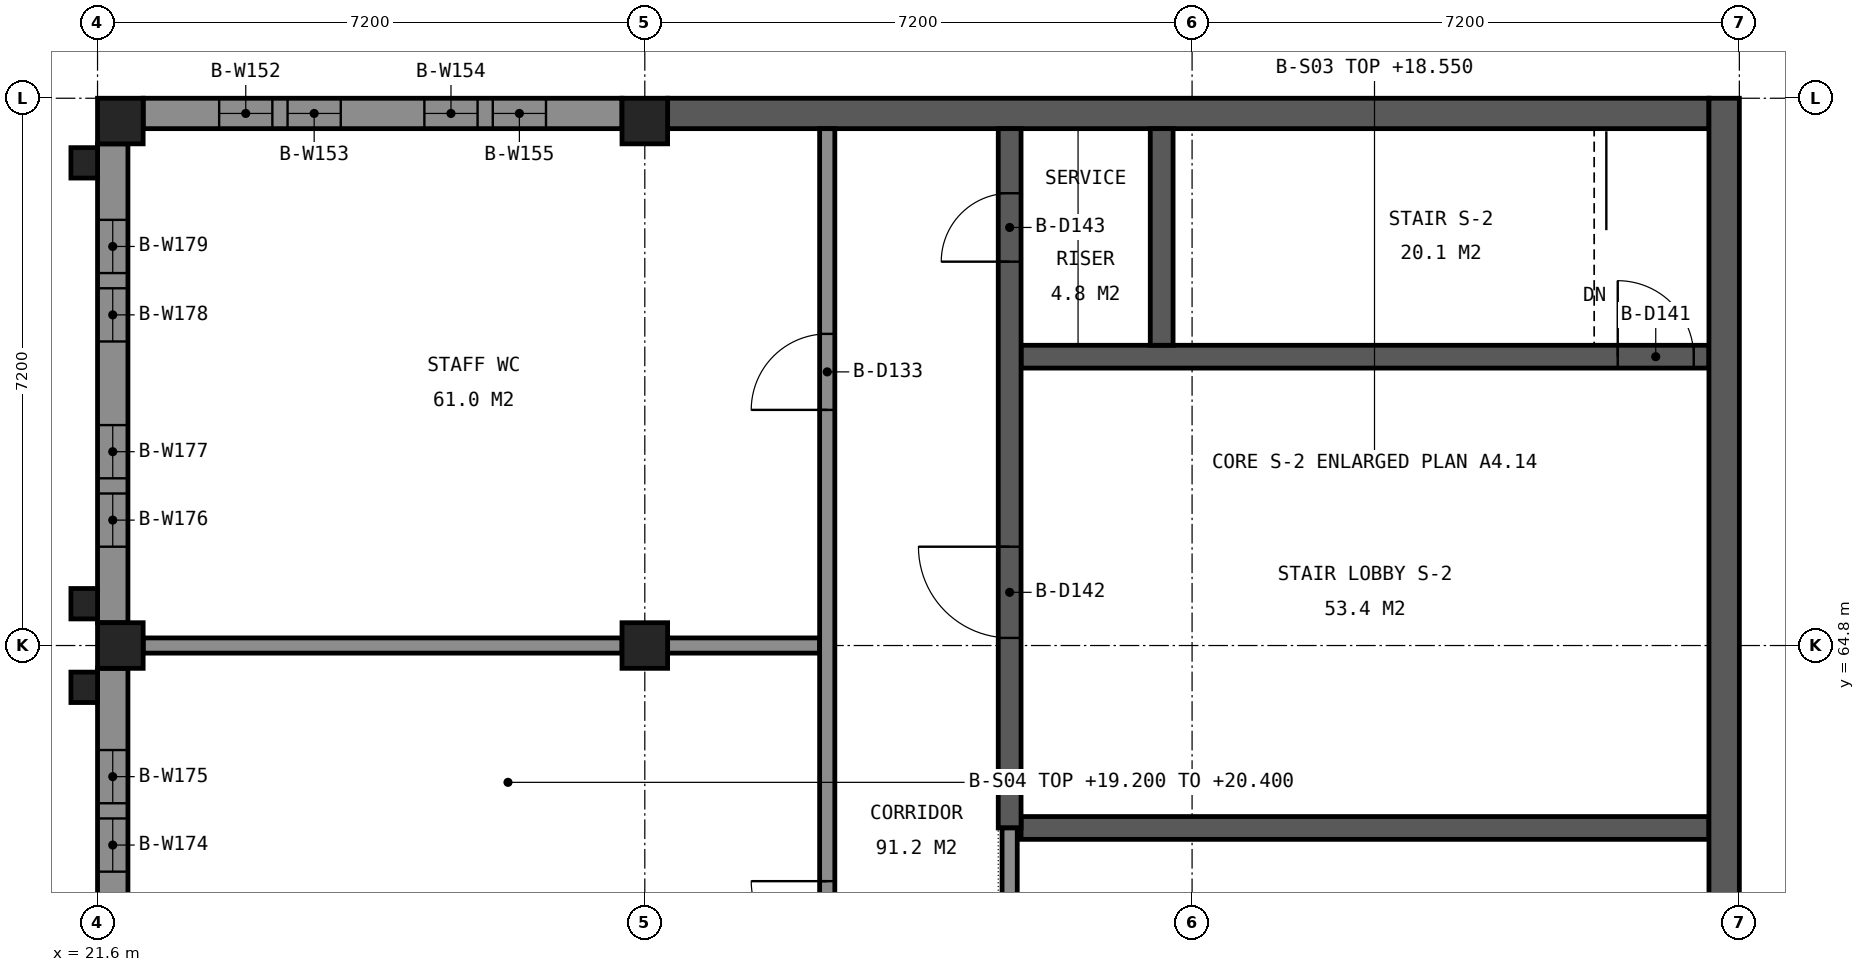
"""IFC4 building model, lengths in metres.
Left out: names, types, materials, properties, quantities, classifications, styles, units other than length and angle.
Written with IfcOpenShell. Run it as: python <this file> out.ifc"""

import sys

from ifc_helpers import new_model, si_unit, direction, frame, frame_2d, origin, origin_2d, place, context, subcontext, project, spatial, polyline, rectangle, outline, extrude, element, fill, save


model = new_model("IFC4")
c1 = context("Model", 3, precision=1e-05, world=origin(), true_north=direction((0.0, 1.0)))
c2 = subcontext(c1, "Body", "Model", "MODEL_VIEW")
j1 = project(units=[si_unit("LENGTHUNIT", "METRE"), si_unit("PLANEANGLEUNIT", "RADIAN")], contexts=[c1])
p1 = place(None, origin())
s1 = spatial("IfcSite", under=j1, at=p1, CompositionType="ELEMENT")
p2 = place(p1, origin())
s2 = spatial("IfcBuilding", under=s1, at=p2, CompositionType="ELEMENT")
p3 = place(p2, frame((0.0, 0.0, 14.4)))
s3 = spatial("IfcBuildingStorey", under=s2, at=p3, CompositionType="ELEMENT", Elevation=14.4)
for number, where, z_axis, x_axis in (
    (1, (21.9, 64.8, 0.0), (0.0, 0.0, 1.0), (1.0, 0.0, 0.0)),
    (2, (21.9, 71.7, 0.0), (0.0, 0.0, 1.0), (1.0, 0.0, 0.0)),
):
    element("IfcColumn", number, at=place(p3, frame(where, z_axis=z_axis, x_axis=x_axis)), inside=s3, PredefinedType="COLUMN", context=c2, shape_type="SweptSolid", body=[
        extrude(rectangle(XDim=0.6, YDim=0.6, at=origin_2d()), origin(), (0.0, 0.0, 1.0), 4.144),
    ])
for number, where, z_axis, x_axis in (
    (3, (28.8, 64.8, 0.0), (0.0, 0.0, 1.0), (1.0, 0.0, 0.0)),
    (4, (28.8, 71.7, 0.0), (0.0, 0.0, 1.0), (1.0, 0.0, 0.0)),
):
    element("IfcColumn", number, at=place(p3, frame(where, z_axis=z_axis, x_axis=x_axis)), inside=s3, PredefinedType="COLUMN", context=c2, shape_type="SweptSolid", body=[
        extrude(rectangle(XDim=0.6, YDim=0.6, at=origin_2d()), origin(), (0.0, 0.0, 1.0), 4.911),
    ])
p4 = place(p3, frame((33.75, 62.4, 0.0), z_axis=(0.0, 0.0, 1.0), x_axis=(1.0, 0.0, 0.0)))
e5 = element("IfcWall", 5, at=p4, inside=s3, PredefinedType="SHEAR", context=c2, shape_type="SweptSolid", body=[
    extrude(rectangle(XDim=9.05, YDim=0.3, at=frame_2d((4.525, 0.0))), origin(), (0.0, 0.0, 1.0), 3.9),
])
p5 = place(p3, frame((33.75, 68.6, 0.0), z_axis=(0.0, 0.0, 1.0), x_axis=(1.0, 0.0, 0.0)))
e6 = element("IfcWall", 6, at=p5, inside=s3, PredefinedType="SHEAR", context=c2, shape_type="SweptSolid", body=[
    extrude(rectangle(XDim=9.05, YDim=0.3, at=frame_2d((4.525, 0.0))), origin(), (0.0, 0.0, 1.0), 3.9),
])
p6 = place(p5, frame((7.85, 0.0, 0.0)))
e7 = element("IfcOpeningElement", 7, at=p6, cuts=e6, PredefinedType="OPENING", context=c2, shape_type="SweptSolid", body=[
    extrude(rectangle(XDim=1.0, YDim=2.1, at=frame_2d((0.5, 1.05))), frame((0.0, 0.16, 0.0), z_axis=(0.0, -1.0, 0.0), x_axis=(1.0, 0.0, 0.0)), (0.0, 0.0, 1.0), 0.32),
])
p7 = place(p3, frame((29.1, 71.8, 0.0), z_axis=(0.0, 0.0, 1.0), x_axis=(1.0, 0.0, 0.0)))
e8 = element("IfcWall", 8, at=p7, inside=s3, PredefinedType="SHEAR", context=c2, shape_type="SweptSolid", body=[
    extrude(outline(polyline([(0.0, 0.0), (13.7, 0.0), (13.7, 4.155), (3.3, 5.311), (0.0, 4.944), (0.0, 0.0)])), frame((0.0, 0.2, 0.0), z_axis=(0.0, -1.0, 0.0), x_axis=(1.0, 0.0, 0.0)), (0.0, 0.0, 1.0), 0.4),
])
p8 = place(p3, frame((33.6, 62.4, 0.0), z_axis=(0.0, 0.0, 1.0), x_axis=(0.0, 1.0, 0.0)))
e9 = element("IfcWall", 9, at=p8, inside=s3, PredefinedType="SHEAR", context=c2, shape_type="SweptSolid", body=[
    extrude(rectangle(XDim=9.2, YDim=0.3, at=frame_2d((4.6, 0.0))), origin(), (0.0, 0.0, 1.0), 5.161),
])
p9 = place(p8, frame((2.5, 0.0, 0.0)))
e10 = element("IfcOpeningElement", 10, at=p9, cuts=e9, PredefinedType="OPENING", context=c2, shape_type="SweptSolid", body=[
    extrude(rectangle(XDim=1.2, YDim=2.1, at=frame_2d((0.6, 1.05))), frame((0.0, 0.16, 0.0), z_axis=(0.0, -1.0, 0.0), x_axis=(1.0, 0.0, 0.0)), (0.0, 0.0, 1.0), 0.32),
])
p10 = place(p8, frame((7.45, 0.0, 0.0)))
e11 = element("IfcOpeningElement", 11, at=p10, cuts=e9, PredefinedType="OPENING", context=c2, shape_type="SweptSolid", body=[
    extrude(rectangle(XDim=0.9, YDim=2.1, at=frame_2d((0.45, 1.05))), frame((0.0, 0.16, 0.0), z_axis=(0.0, -1.0, 0.0), x_axis=(1.0, 0.0, 0.0)), (0.0, 0.0, 1.0), 0.32),
])
p11 = place(p3, frame((35.6, 68.75, 0.0), z_axis=(0.0, 0.0, 1.0), x_axis=(0.0, 1.0, 0.0)))
e12 = element("IfcWall", 12, at=p11, inside=s3, PredefinedType="SHEAR", context=c2, shape_type="SweptSolid", body=[
    extrude(rectangle(XDim=2.85, YDim=0.3, at=frame_2d((1.425, 0.0))), origin(), (0.0, 0.0, 1.0), 3.9),
])
p12 = place(p3, frame((43.0, 57.9, 0.0), z_axis=(0.0, 0.0, 1.0), x_axis=(0.0, 1.0, 0.0)))
e13 = element("IfcWall", 13, at=p12, inside=s3, PredefinedType="SHEAR", context=c2, shape_type="SweptSolid", body=[
    extrude(rectangle(XDim=14.1, YDim=0.4, at=frame_2d((7.05, 0.0))), origin(), (0.0, 0.0, 1.0), 4.133),
])
p13 = place(p3, frame((22.2, 71.8, 0.0), z_axis=(0.0, 0.0, 1.0), x_axis=(1.0, 0.0, 0.0)))
e14 = element("IfcWall", 14, at=p13, inside=s3, PredefinedType="SOLIDWALL", context=c2, shape_type="SweptSolid", body=[
    extrude(outline(polyline([(0.0, 0.0), (6.3, 0.0), (6.3, 4.878), (0.0, 4.177), (0.0, 0.0)])), frame((0.0, 0.2, 0.0), z_axis=(0.0, -1.0, 0.0), x_axis=(1.0, 0.0, 0.0)), (0.0, 0.0, 1.0), 0.4),
])
p14 = place(p13, frame((1.0, 0.0, 1.6)))
e15 = element("IfcOpeningElement", 15, at=p14, cuts=e14, PredefinedType="OPENING", context=c2, shape_type="SweptSolid", body=[
    extrude(rectangle(XDim=0.7, YDim=1.2, at=frame_2d((0.35, 0.6))), frame((0.0, 0.21, 0.0), z_axis=(0.0, -1.0, 0.0), x_axis=(1.0, 0.0, 0.0)), (0.0, 0.0, 1.0), 0.42),
])
p15 = place(p13, frame((1.9, 0.0, 1.6)))
e16 = element("IfcOpeningElement", 16, at=p15, cuts=e14, PredefinedType="OPENING", context=c2, shape_type="SweptSolid", body=[
    extrude(rectangle(XDim=0.7, YDim=1.2, at=frame_2d((0.35, 0.6))), frame((0.0, 0.21, 0.0), z_axis=(0.0, -1.0, 0.0), x_axis=(1.0, 0.0, 0.0)), (0.0, 0.0, 1.0), 0.42),
])
p16 = place(p13, frame((3.7, 0.0, 1.6)))
e17 = element("IfcOpeningElement", 17, at=p16, cuts=e14, PredefinedType="OPENING", context=c2, shape_type="SweptSolid", body=[
    extrude(rectangle(XDim=0.7, YDim=1.2, at=frame_2d((0.35, 0.6))), frame((0.0, 0.21, 0.0), z_axis=(0.0, -1.0, 0.0), x_axis=(1.0, 0.0, 0.0)), (0.0, 0.0, 1.0), 0.42),
])
p17 = place(p13, frame((4.6, 0.0, 1.6)))
e18 = element("IfcOpeningElement", 18, at=p17, cuts=e14, PredefinedType="OPENING", context=c2, shape_type="SweptSolid", body=[
    extrude(rectangle(XDim=0.7, YDim=1.2, at=frame_2d((0.35, 0.6))), frame((0.0, 0.21, 0.0), z_axis=(0.0, -1.0, 0.0), x_axis=(1.0, 0.0, 0.0)), (0.0, 0.0, 1.0), 0.42),
])
p18 = place(p3, frame((21.8, 57.9, 0.0), z_axis=(0.0, 0.0, 1.0), x_axis=(0.0, 1.0, 0.0)))
e19 = element("IfcWall", 19, at=p18, inside=s3, PredefinedType="SOLIDWALL", context=c2, shape_type="SweptSolid", body=[
    extrude(rectangle(XDim=6.6, YDim=0.4, at=frame_2d((3.3, 0.0))), origin(), (0.0, 0.0, 1.0), 4.133),
])
p19 = place(p18, frame((1.075, 0.0, 1.6)))
e20 = element("IfcOpeningElement", 20, at=p19, cuts=e19, PredefinedType="OPENING", context=c2, shape_type="SweptSolid", body=[
    extrude(rectangle(XDim=0.7, YDim=1.2, at=frame_2d((0.35, 0.6))), frame((0.0, 0.21, 0.0), z_axis=(0.0, -1.0, 0.0), x_axis=(1.0, 0.0, 0.0)), (0.0, 0.0, 1.0), 0.42),
])
p20 = place(p18, frame((1.975, 0.0, 1.6)))
e21 = element("IfcOpeningElement", 21, at=p20, cuts=e19, PredefinedType="OPENING", context=c2, shape_type="SweptSolid", body=[
    extrude(rectangle(XDim=0.7, YDim=1.2, at=frame_2d((0.35, 0.6))), frame((0.0, 0.21, 0.0), z_axis=(0.0, -1.0, 0.0), x_axis=(1.0, 0.0, 0.0)), (0.0, 0.0, 1.0), 0.42),
])
p21 = place(p18, frame((3.925, 0.0, 1.6)))
e22 = element("IfcOpeningElement", 22, at=p21, cuts=e19, PredefinedType="OPENING", context=c2, shape_type="SweptSolid", body=[
    extrude(rectangle(XDim=0.7, YDim=1.2, at=frame_2d((0.35, 0.6))), frame((0.0, 0.21, 0.0), z_axis=(0.0, -1.0, 0.0), x_axis=(1.0, 0.0, 0.0)), (0.0, 0.0, 1.0), 0.42),
])
p22 = place(p18, frame((4.825, 0.0, 1.6)))
e23 = element("IfcOpeningElement", 23, at=p22, cuts=e19, PredefinedType="OPENING", context=c2, shape_type="SweptSolid", body=[
    extrude(rectangle(XDim=0.7, YDim=1.2, at=frame_2d((0.35, 0.6))), frame((0.0, 0.21, 0.0), z_axis=(0.0, -1.0, 0.0), x_axis=(1.0, 0.0, 0.0)), (0.0, 0.0, 1.0), 0.42),
])
p23 = place(p3, frame((21.8, 65.1, 0.0), z_axis=(0.0, 0.0, 1.0), x_axis=(0.0, 1.0, 0.0)))
e24 = element("IfcWall", 24, at=p23, inside=s3, PredefinedType="SOLIDWALL", context=c2, shape_type="SweptSolid", body=[
    extrude(rectangle(XDim=6.3, YDim=0.4, at=frame_2d((3.15, 0.0))), origin(), (0.0, 0.0, 1.0), 4.133),
])
p24 = place(p23, frame((1.0, 0.0, 1.6)))
e25 = element("IfcOpeningElement", 25, at=p24, cuts=e24, PredefinedType="OPENING", context=c2, shape_type="SweptSolid", body=[
    extrude(rectangle(XDim=0.7, YDim=1.2, at=frame_2d((0.35, 0.6))), frame((0.0, 0.21, 0.0), z_axis=(0.0, -1.0, 0.0), x_axis=(1.0, 0.0, 0.0)), (0.0, 0.0, 1.0), 0.42),
])
p25 = place(p23, frame((1.9, 0.0, 1.6)))
e26 = element("IfcOpeningElement", 26, at=p25, cuts=e24, PredefinedType="OPENING", context=c2, shape_type="SweptSolid", body=[
    extrude(rectangle(XDim=0.7, YDim=1.2, at=frame_2d((0.35, 0.6))), frame((0.0, 0.21, 0.0), z_axis=(0.0, -1.0, 0.0), x_axis=(1.0, 0.0, 0.0)), (0.0, 0.0, 1.0), 0.42),
])
p26 = place(p23, frame((3.7, 0.0, 1.6)))
e27 = element("IfcOpeningElement", 27, at=p26, cuts=e24, PredefinedType="OPENING", context=c2, shape_type="SweptSolid", body=[
    extrude(rectangle(XDim=0.7, YDim=1.2, at=frame_2d((0.35, 0.6))), frame((0.0, 0.21, 0.0), z_axis=(0.0, -1.0, 0.0), x_axis=(1.0, 0.0, 0.0)), (0.0, 0.0, 1.0), 0.42),
])
p27 = place(p23, frame((4.6, 0.0, 1.6)))
e28 = element("IfcOpeningElement", 28, at=p27, cuts=e24, PredefinedType="OPENING", context=c2, shape_type="SweptSolid", body=[
    extrude(rectangle(XDim=0.7, YDim=1.2, at=frame_2d((0.35, 0.6))), frame((0.0, 0.21, 0.0), z_axis=(0.0, -1.0, 0.0), x_axis=(1.0, 0.0, 0.0)), (0.0, 0.0, 1.0), 0.42),
])
for number, where, z_axis, x_axis in (
    (29, (21.425, 64.25, 0.0), (0.0, 0.0, 1.0), (1.0, 0.0, 0.0)),
    (30, (21.425, 65.35, 0.0), (0.0, 0.0, 1.0), (1.0, 0.0, 0.0)),
    (31, (21.425, 71.15, 0.0), (0.0, 0.0, 1.0), (1.0, 0.0, 0.0)),
):
    element("IfcColumn", number, at=place(p3, frame(where, z_axis=z_axis, x_axis=x_axis)), inside=s3, PredefinedType="COLUMN", context=c2, shape_type="SweptSolid", body=[
        extrude(rectangle(XDim=0.35, YDim=0.4, at=origin_2d()), origin(), (0.0, 0.0, 1.0), 4.1),
    ])
p28 = place(p3, frame((22.2, 64.8, 0.0), z_axis=(0.0, 0.0, 1.0), x_axis=(1.0, 0.0, 0.0)))
e32 = element("IfcWall", 32, at=p28, inside=s3, PredefinedType="PARTITIONING", context=c2, shape_type="SweptSolid", body=[
    extrude(rectangle(XDim=6.3, YDim=0.2, at=frame_2d((3.15, 0.0))), origin(), (0.0, 0.0, 1.0), 4.0),
])
p29 = place(p3, frame((29.1, 64.8, 0.0), z_axis=(0.0, 0.0, 1.0), x_axis=(1.0, 0.0, 0.0)))
e33 = element("IfcWall", 33, at=p29, inside=s3, PredefinedType="PARTITIONING", context=c2, shape_type="SweptSolid", body=[
    extrude(rectangle(XDim=2.0, YDim=0.2, at=frame_2d((1.0, 0.0))), origin(), (0.0, 0.0, 1.0), 4.0),
])
p30 = place(p3, frame((31.2, 29.2, 0.0), z_axis=(0.0, 0.0, 1.0), x_axis=(0.0, 1.0, 0.0)))
e34 = element("IfcWall", 34, at=p30, inside=s3, PredefinedType="PARTITIONING", context=c2, shape_type="SweptSolid", body=[
    extrude(rectangle(XDim=42.4, YDim=0.2, at=frame_2d((21.2, 0.0))), origin(), (0.0, 0.0, 1.0), 4.0),
])
p31 = place(p30, frame((2.7, 0.0, 0.0)))
e35 = element("IfcOpeningElement", 35, at=p31, cuts=e34, PredefinedType="OPENING", context=c2, shape_type="SweptSolid", body=[
    extrude(rectangle(XDim=1.0, YDim=2.1, at=frame_2d((0.5, 1.05))), frame((0.0, 0.11, 0.0), z_axis=(0.0, -1.0, 0.0), x_axis=(1.0, 0.0, 0.0)), (0.0, 0.0, 1.0), 0.22),
])
p32 = place(p30, frame((9.9, 0.0, 0.0)))
e36 = element("IfcOpeningElement", 36, at=p32, cuts=e34, PredefinedType="OPENING", context=c2, shape_type="SweptSolid", body=[
    extrude(rectangle(XDim=1.0, YDim=2.1, at=frame_2d((0.5, 1.05))), frame((0.0, 0.11, 0.0), z_axis=(0.0, -1.0, 0.0), x_axis=(1.0, 0.0, 0.0)), (0.0, 0.0, 1.0), 0.22),
])
p33 = place(p30, frame((17.1, 0.0, 0.0)))
e37 = element("IfcOpeningElement", 37, at=p33, cuts=e34, PredefinedType="OPENING", context=c2, shape_type="SweptSolid", body=[
    extrude(rectangle(XDim=1.0, YDim=2.1, at=frame_2d((0.5, 1.05))), frame((0.0, 0.11, 0.0), z_axis=(0.0, -1.0, 0.0), x_axis=(1.0, 0.0, 0.0)), (0.0, 0.0, 1.0), 0.22),
])
p34 = place(p30, frame((24.3, 0.0, 0.0)))
e38 = element("IfcOpeningElement", 38, at=p34, cuts=e34, PredefinedType="OPENING", context=c2, shape_type="SweptSolid", body=[
    extrude(rectangle(XDim=1.0, YDim=2.1, at=frame_2d((0.5, 1.05))), frame((0.0, 0.11, 0.0), z_axis=(0.0, -1.0, 0.0), x_axis=(1.0, 0.0, 0.0)), (0.0, 0.0, 1.0), 0.22),
])
p35 = place(p30, frame((31.5, 0.0, 0.0)))
e39 = element("IfcOpeningElement", 39, at=p35, cuts=e34, PredefinedType="OPENING", context=c2, shape_type="SweptSolid", body=[
    extrude(rectangle(XDim=1.0, YDim=2.1, at=frame_2d((0.5, 1.05))), frame((0.0, 0.11, 0.0), z_axis=(0.0, -1.0, 0.0), x_axis=(1.0, 0.0, 0.0)), (0.0, 0.0, 1.0), 0.22),
])
p36 = place(p30, frame((38.7, 0.0, 0.0)))
e40 = element("IfcOpeningElement", 40, at=p36, cuts=e34, PredefinedType="OPENING", context=c2, shape_type="SweptSolid", body=[
    extrude(rectangle(XDim=1.0, YDim=2.1, at=frame_2d((0.5, 1.05))), frame((0.0, 0.11, 0.0), z_axis=(0.0, -1.0, 0.0), x_axis=(1.0, 0.0, 0.0)), (0.0, 0.0, 1.0), 0.22),
])
p37 = place(p3, frame((33.6, 38.4, 0.0), z_axis=(0.0, 0.0, 1.0), x_axis=(0.0, 1.0, 0.0)))
e41 = element("IfcWall", 41, at=p37, inside=s3, PredefinedType="PARTITIONING", context=c2, shape_type="SweptSolid", body=[
    extrude(rectangle(XDim=24.0, YDim=0.2, at=frame_2d((12.0, 0.0))), origin(), (0.0, 0.0, 1.0), 4.0),
])
p38 = place(p37, frame((3.1, 0.0, 0.0)))
e42 = element("IfcOpeningElement", 42, at=p38, cuts=e41, PredefinedType="OPENING", context=c2, shape_type="SweptSolid", body=[
    extrude(rectangle(XDim=1.0, YDim=2.1, at=frame_2d((0.5, 1.05))), frame((0.0, 0.11, 0.0), z_axis=(0.0, -1.0, 0.0), x_axis=(1.0, 0.0, 0.0)), (0.0, 0.0, 1.0), 0.22),
])
p39 = place(p37, frame((15.1, 0.0, 0.0)))
e43 = element("IfcOpeningElement", 43, at=p39, cuts=e41, PredefinedType="OPENING", context=c2, shape_type="SweptSolid", body=[
    extrude(rectangle(XDim=1.0, YDim=2.1, at=frame_2d((0.5, 1.05))), frame((0.0, 0.11, 0.0), z_axis=(0.0, -1.0, 0.0), x_axis=(1.0, 0.0, 0.0)), (0.0, 0.0, 1.0), 0.22),
])
p40 = place(p14, origin())
e44 = element("IfcWindow", 44, at=p40, inside=s3, PartitioningType="SINGLE_PANEL", PredefinedType="WINDOW", context=c2, shape_type="SweptSolid", body=[
    extrude(rectangle(XDim=0.7, YDim=1.2, at=frame_2d((0.35, 0.6))), frame((0.0, 0.03, 0.0), z_axis=(0.0, -1.0, 0.0), x_axis=(1.0, 0.0, 0.0)), (0.0, 0.0, 1.0), 0.06),
])
fill(e15, e44)
p41 = place(p15, origin())
e45 = element("IfcWindow", 45, at=p41, inside=s3, PartitioningType="SINGLE_PANEL", PredefinedType="WINDOW", context=c2, shape_type="SweptSolid", body=[
    extrude(rectangle(XDim=0.7, YDim=1.2, at=frame_2d((0.35, 0.6))), frame((0.0, 0.03, 0.0), z_axis=(0.0, -1.0, 0.0), x_axis=(1.0, 0.0, 0.0)), (0.0, 0.0, 1.0), 0.06),
])
fill(e16, e45)
p42 = place(p16, origin())
e46 = element("IfcWindow", 46, at=p42, inside=s3, PartitioningType="SINGLE_PANEL", PredefinedType="WINDOW", context=c2, shape_type="SweptSolid", body=[
    extrude(rectangle(XDim=0.7, YDim=1.2, at=frame_2d((0.35, 0.6))), frame((0.0, 0.03, 0.0), z_axis=(0.0, -1.0, 0.0), x_axis=(1.0, 0.0, 0.0)), (0.0, 0.0, 1.0), 0.06),
])
fill(e17, e46)
p43 = place(p17, origin())
e47 = element("IfcWindow", 47, at=p43, inside=s3, PartitioningType="SINGLE_PANEL", PredefinedType="WINDOW", context=c2, shape_type="SweptSolid", body=[
    extrude(rectangle(XDim=0.7, YDim=1.2, at=frame_2d((0.35, 0.6))), frame((0.0, 0.03, 0.0), z_axis=(0.0, -1.0, 0.0), x_axis=(1.0, 0.0, 0.0)), (0.0, 0.0, 1.0), 0.06),
])
fill(e18, e47)
p44 = place(p21, origin())
e48 = element("IfcWindow", 48, at=p44, inside=s3, PartitioningType="SINGLE_PANEL", PredefinedType="WINDOW", context=c2, shape_type="SweptSolid", body=[
    extrude(rectangle(XDim=0.7, YDim=1.2, at=frame_2d((0.35, 0.6))), frame((0.0, 0.03, 0.0), z_axis=(0.0, -1.0, 0.0), x_axis=(1.0, 0.0, 0.0)), (0.0, 0.0, 1.0), 0.06),
])
fill(e22, e48)
p45 = place(p22, origin())
e49 = element("IfcWindow", 49, at=p45, inside=s3, PartitioningType="SINGLE_PANEL", PredefinedType="WINDOW", context=c2, shape_type="SweptSolid", body=[
    extrude(rectangle(XDim=0.7, YDim=1.2, at=frame_2d((0.35, 0.6))), frame((0.0, 0.03, 0.0), z_axis=(0.0, -1.0, 0.0), x_axis=(1.0, 0.0, 0.0)), (0.0, 0.0, 1.0), 0.06),
])
fill(e23, e49)
p46 = place(p24, origin())
e50 = element("IfcWindow", 50, at=p46, inside=s3, PartitioningType="SINGLE_PANEL", PredefinedType="WINDOW", context=c2, shape_type="SweptSolid", body=[
    extrude(rectangle(XDim=0.7, YDim=1.2, at=frame_2d((0.35, 0.6))), frame((0.0, 0.03, 0.0), z_axis=(0.0, -1.0, 0.0), x_axis=(1.0, 0.0, 0.0)), (0.0, 0.0, 1.0), 0.06),
])
fill(e25, e50)
p47 = place(p25, origin())
e51 = element("IfcWindow", 51, at=p47, inside=s3, PartitioningType="SINGLE_PANEL", PredefinedType="WINDOW", context=c2, shape_type="SweptSolid", body=[
    extrude(rectangle(XDim=0.7, YDim=1.2, at=frame_2d((0.35, 0.6))), frame((0.0, 0.03, 0.0), z_axis=(0.0, -1.0, 0.0), x_axis=(1.0, 0.0, 0.0)), (0.0, 0.0, 1.0), 0.06),
])
fill(e26, e51)
p48 = place(p26, origin())
e52 = element("IfcWindow", 52, at=p48, inside=s3, PartitioningType="SINGLE_PANEL", PredefinedType="WINDOW", context=c2, shape_type="SweptSolid", body=[
    extrude(rectangle(XDim=0.7, YDim=1.2, at=frame_2d((0.35, 0.6))), frame((0.0, 0.03, 0.0), z_axis=(0.0, -1.0, 0.0), x_axis=(1.0, 0.0, 0.0)), (0.0, 0.0, 1.0), 0.06),
])
fill(e27, e52)
p49 = place(p27, origin())
e53 = element("IfcWindow", 53, at=p49, inside=s3, PartitioningType="SINGLE_PANEL", PredefinedType="WINDOW", context=c2, shape_type="SweptSolid", body=[
    extrude(rectangle(XDim=0.7, YDim=1.2, at=frame_2d((0.35, 0.6))), frame((0.0, 0.03, 0.0), z_axis=(0.0, -1.0, 0.0), x_axis=(1.0, 0.0, 0.0)), (0.0, 0.0, 1.0), 0.06),
])
fill(e28, e53)
p50 = place(p35, origin())
e54 = element("IfcDoor", 54, at=p50, inside=s3, OperationType="SINGLE_SWING_RIGHT", PredefinedType="DOOR", context=c2, shape_type="SweptSolid", body=[
    extrude(rectangle(XDim=1.0, YDim=2.1, at=frame_2d((0.5, 1.05))), frame((0.0, 0.025, 0.0), z_axis=(0.0, -1.0, 0.0), x_axis=(1.0, 0.0, 0.0)), (0.0, 0.0, 1.0), 0.05),
])
fill(e39, e54)
p51 = place(p36, origin())
e55 = element("IfcDoor", 55, at=p51, inside=s3, OperationType="SINGLE_SWING_LEFT", PredefinedType="DOOR", context=c2, shape_type="SweptSolid", body=[
    extrude(rectangle(XDim=1.0, YDim=2.1, at=frame_2d((0.5, 1.05))), frame((0.0, 0.025, 0.0), z_axis=(0.0, -1.0, 0.0), x_axis=(1.0, 0.0, 0.0)), (0.0, 0.0, 1.0), 0.05),
])
fill(e40, e55)
p52 = place(p6, origin())
e56 = element("IfcDoor", 56, at=p52, inside=s3, OperationType="SINGLE_SWING_LEFT", PredefinedType="DOOR", context=c2, shape_type="SweptSolid", body=[
    extrude(rectangle(XDim=1.0, YDim=2.1, at=frame_2d((0.5, 1.05))), frame((0.0, 0.025, 0.0), z_axis=(0.0, -1.0, 0.0), x_axis=(1.0, 0.0, 0.0)), (0.0, 0.0, 1.0), 0.05),
])
fill(e7, e56)
p53 = place(p9, origin())
e57 = element("IfcDoor", 57, at=p53, inside=s3, OperationType="SINGLE_SWING_RIGHT", PredefinedType="DOOR", context=c2, shape_type="SweptSolid", body=[
    extrude(rectangle(XDim=1.2, YDim=2.1, at=frame_2d((0.6, 1.05))), frame((0.0, 0.025, 0.0), z_axis=(0.0, -1.0, 0.0), x_axis=(1.0, 0.0, 0.0)), (0.0, 0.0, 1.0), 0.05),
])
fill(e10, e57)
p54 = place(p10, origin())
e58 = element("IfcDoor", 58, at=p54, inside=s3, OperationType="SINGLE_SWING_LEFT", PredefinedType="DOOR", context=c2, shape_type="SweptSolid", body=[
    extrude(rectangle(XDim=0.9, YDim=2.1, at=frame_2d((0.45, 1.05))), frame((0.0, 0.025, 0.0), z_axis=(0.0, -1.0, 0.0), x_axis=(1.0, 0.0, 0.0)), (0.0, 0.0, 1.0), 0.05),
])
fill(e11, e58)
save(model, sys.argv[1])
